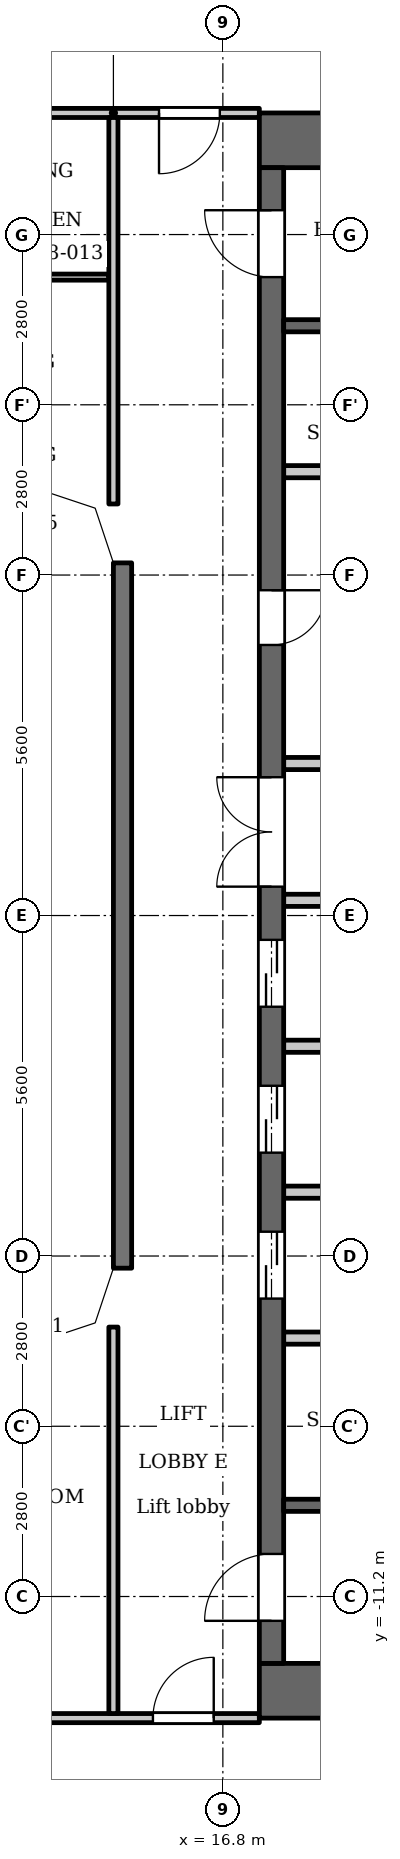
"""IFC4 building model, lengths in metres.
Left out: names, types, materials, properties, quantities, classifications, styles, units other than length and angle.
Written with IfcOpenShell. Run it as: python <this file> out.ifc"""

import sys

from ifc_helpers import new_model, si_unit, direction, frame, frame_2d, origin, place, context, subcontext, project, spatial, polyline, rectangle, outline, extrude, element, fill, save


model = new_model("IFC4")
c1 = context("Model", 3, precision=1e-05, world=origin(), true_north=direction((0.0, 1.0)))
c2 = subcontext(c1, "Body", "Model", "MODEL_VIEW")
j1 = project(units=[si_unit("LENGTHUNIT", "METRE"), si_unit("PLANEANGLEUNIT", "RADIAN")], contexts=[c1])
p1 = place(None, origin())
s1 = spatial("IfcSite", under=j1, at=p1, CompositionType="ELEMENT")
p2 = place(p1, origin())
s2 = spatial("IfcBuilding", under=s1, at=p2, CompositionType="ELEMENT")
p3 = place(p2, frame((0.0, 0.0, 111.3)))
s3 = spatial("IfcBuildingStorey", under=s2, at=p3, CompositionType="ELEMENT", Elevation=111.3)
p4 = place(p3, frame((15.15, 5.8, 0.0), z_axis=(0.0, 0.0, 1.0), x_axis=(0.0, -1.0, 0.0)))
e1 = element("IfcWall", 1, at=p4, inside=s3, PredefinedType="SOLIDWALL", context=c2, shape_type="SweptSolid", body=[
    extrude(rectangle(XDim=11.6, YDim=0.3, at=frame_2d((5.8, 0.0))), origin(), (0.0, 0.0, 1.0), 3.2),
])
for number, where, z_axis, x_axis in (
    (2, (17.4, 12.75, 0.0), (0.0, 0.0, 1.0), (1.0, 0.0, 0.0)),
    (3, (17.4, -12.75, 0.0), (0.0, 0.0, 1.0), (1.0, 0.0, 0.0)),
):
    element("IfcWall", number, at=place(p3, frame(where, z_axis=z_axis, x_axis=x_axis)), inside=s3, PredefinedType="SHEAR", context=c2, shape_type="SweptSolid", body=[
        extrude(rectangle(XDim=10.4, YDim=0.9, at=frame_2d((5.2, 0.0))), origin(), (0.0, 0.0, 1.0), 3.2),
    ])
p5 = place(p3, frame((17.6, -12.3, 0.0), z_axis=(0.0, 0.0, 1.0), x_axis=(0.0, 1.0, 0.0)))
e4 = element("IfcWall", 4, at=p5, inside=s3, PredefinedType="SHEAR", context=c2, shape_type="SweptSolid", body=[
    extrude(rectangle(XDim=24.6, YDim=0.4, at=frame_2d((12.3, 0.0))), origin(), (0.0, 0.0, 1.0), 3.2),
])
p6 = place(p5, frame((6.0, 0.0, 0.0)))
e5 = element("IfcOpeningElement", 5, at=p6, cuts=e4, PredefinedType="OPENING", context=c2, shape_type="SweptSolid", body=[
    extrude(rectangle(XDim=1.1, YDim=2.1, at=frame_2d((0.55, 1.05))), frame((0.0, 0.21, 0.0), z_axis=(0.0, -1.0, 0.0), x_axis=(1.0, 0.0, 0.0)), (0.0, 0.0, 1.0), 0.42),
])
p7 = place(p5, frame((8.4, 0.0, 0.0)))
e6 = element("IfcOpeningElement", 6, at=p7, cuts=e4, PredefinedType="OPENING", context=c2, shape_type="SweptSolid", body=[
    extrude(rectangle(XDim=1.1, YDim=2.1, at=frame_2d((0.55, 1.05))), frame((0.0, 0.21, 0.0), z_axis=(0.0, -1.0, 0.0), x_axis=(1.0, 0.0, 0.0)), (0.0, 0.0, 1.0), 0.42),
])
p8 = place(p5, frame((10.8, 0.0, 0.0)))
e7 = element("IfcOpeningElement", 7, at=p8, cuts=e4, PredefinedType="OPENING", context=c2, shape_type="SweptSolid", body=[
    extrude(rectangle(XDim=1.1, YDim=2.1, at=frame_2d((0.55, 1.05))), frame((0.0, 0.21, 0.0), z_axis=(0.0, -1.0, 0.0), x_axis=(1.0, 0.0, 0.0)), (0.0, 0.0, 1.0), 0.42),
])
p9 = place(p5, frame((16.75, 0.0, 0.0)))
e8 = element("IfcOpeningElement", 8, at=p9, cuts=e4, PredefinedType="OPENING", context=c2, shape_type="SweptSolid", body=[
    extrude(rectangle(XDim=0.9, YDim=2.1, at=frame_2d((0.45, 1.05))), frame((0.0, 0.21, 0.0), z_axis=(0.0, -1.0, 0.0), x_axis=(1.0, 0.0, 0.0)), (0.0, 0.0, 1.0), 0.42),
])
p10 = place(p5, frame((22.8, 0.0, 0.0)))
e9 = element("IfcOpeningElement", 9, at=p10, cuts=e4, PredefinedType="OPENING", context=c2, shape_type="SweptSolid", body=[
    extrude(rectangle(XDim=1.1, YDim=2.1, at=frame_2d((0.55, 1.05))), frame((0.0, 0.21, 0.0), z_axis=(0.0, -1.0, 0.0), x_axis=(1.0, 0.0, 0.0)), (0.0, 0.0, 1.0), 0.42),
])
p11 = place(p5, frame((0.7, 0.0, 0.0)))
e10 = element("IfcOpeningElement", 10, at=p11, cuts=e4, PredefinedType="OPENING", context=c2, shape_type="SweptSolid", body=[
    extrude(rectangle(XDim=1.1, YDim=2.1, at=frame_2d((0.55, 1.05))), frame((0.0, 0.21, 0.0), z_axis=(0.0, -1.0, 0.0), x_axis=(1.0, 0.0, 0.0)), (0.0, 0.0, 1.0), 0.42),
])
p12 = place(p5, frame((12.775, 0.0, 0.0)))
e11 = element("IfcOpeningElement", 11, at=p12, cuts=e4, PredefinedType="OPENING", context=c2, shape_type="SweptSolid", body=[
    extrude(rectangle(XDim=1.8, YDim=2.1, at=frame_2d((0.9, 1.05))), frame((0.0, 0.21, 0.0), z_axis=(0.0, -1.0, 0.0), x_axis=(1.0, 0.0, 0.0)), (0.0, 0.0, 1.0), 0.42),
])
p13 = place(p3, frame((17.8, -9.7, 0.0), z_axis=(0.0, 0.0, 1.0), x_axis=(1.0, 0.0, 0.0)))
e12 = element("IfcWall", 12, at=p13, inside=s3, PredefinedType="SHEAR", context=c2, shape_type="SweptSolid", body=[
    extrude(rectangle(XDim=8.3, YDim=0.2, at=frame_2d((4.15, 0.0))), origin(), (0.0, 0.0, 1.0), 3.2),
])
p14 = place(p13, frame((0.85, 0.0, 0.0)))
e13 = element("IfcOpeningElement", 13, at=p14, cuts=e12, PredefinedType="OPENING", context=c2, shape_type="SweptSolid", body=[
    extrude(rectangle(XDim=1.1, YDim=2.1, at=frame_2d((0.55, 1.05))), frame((0.0, 0.11, 0.0), z_axis=(0.0, -1.0, 0.0), x_axis=(1.0, 0.0, 0.0)), (0.0, 0.0, 1.0), 0.22),
])
p15 = place(p13, frame((3.75, 0.0, 0.0)))
e14 = element("IfcOpeningElement", 14, at=p15, cuts=e12, PredefinedType="OPENING", context=c2, shape_type="SweptSolid", body=[
    extrude(rectangle(XDim=1.1, YDim=2.1, at=frame_2d((0.55, 1.05))), frame((0.0, 0.11, 0.0), z_axis=(0.0, -1.0, 0.0), x_axis=(1.0, 0.0, 0.0)), (0.0, 0.0, 1.0), 0.22),
])
for number, where, z_axis, x_axis in (
    (15, (17.8, -6.95, 0.0), (0.0, 0.0, 1.0), (1.0, 0.0, 0.0)),
    (16, (17.8, -4.55, 0.0), (0.0, 0.0, 1.0), (1.0, 0.0, 0.0)),
    (17, (17.8, -2.15, 0.0), (0.0, 0.0, 1.0), (1.0, 0.0, 0.0)),
):
    element("IfcWall", number, at=place(p3, frame(where, z_axis=z_axis, x_axis=x_axis)), inside=s3, PredefinedType="PARTITIONING", context=c2, shape_type="SweptSolid", body=[
        extrude(rectangle(XDim=2.8, YDim=0.2, at=frame_2d((1.4, 0.0))), origin(), (0.0, 0.0, 1.0), 3.2),
    ])
for number, where, z_axis, x_axis in (
    (18, (17.8, 0.25, 0.0), (0.0, 0.0, 1.0), (1.0, 0.0, 0.0)),
    (19, (17.8, 2.5, 0.0), (0.0, 0.0, 1.0), (1.0, 0.0, 0.0)),
):
    element("IfcWall", number, at=place(p3, frame(where, z_axis=z_axis, x_axis=x_axis)), inside=s3, PredefinedType="PARTITIONING", context=c2, shape_type="SweptSolid", body=[
        extrude(rectangle(XDim=3.0, YDim=0.2, at=frame_2d((1.5, 0.0))), origin(), (0.0, 0.0, 1.0), 3.2),
    ])
p16 = place(p3, frame((17.8, 7.3, 0.0), z_axis=(0.0, 0.0, 1.0), x_axis=(1.0, 0.0, 0.0)))
e20 = element("IfcWall", 20, at=p16, inside=s3, PredefinedType="PARTITIONING", context=c2, shape_type="SweptSolid", body=[
    extrude(rectangle(XDim=2.8, YDim=0.2, at=frame_2d((1.4, 0.0))), origin(), (0.0, 0.0, 1.0), 3.2),
])
p17 = place(p3, frame((17.8, 9.7, 0.0), z_axis=(0.0, 0.0, 1.0), x_axis=(1.0, 0.0, 0.0)))
e21 = element("IfcWall", 21, at=p17, inside=s3, PredefinedType="SHEAR", context=c2, shape_type="SweptSolid", body=[
    extrude(rectangle(XDim=8.3, YDim=0.2, at=frame_2d((4.15, 0.0))), origin(), (0.0, 0.0, 1.0), 3.2),
])
p18 = place(p17, frame((0.85, 0.0, 0.0)))
e22 = element("IfcOpeningElement", 22, at=p18, cuts=e21, PredefinedType="OPENING", context=c2, shape_type="SweptSolid", body=[
    extrude(rectangle(XDim=1.1, YDim=2.1, at=frame_2d((0.55, 1.05))), frame((0.0, 0.11, 0.0), z_axis=(0.0, -1.0, 0.0), x_axis=(1.0, 0.0, 0.0)), (0.0, 0.0, 1.0), 0.22),
])
p19 = place(p17, frame((3.75, 0.0, 0.0)))
e23 = element("IfcOpeningElement", 23, at=p19, cuts=e21, PredefinedType="OPENING", context=c2, shape_type="SweptSolid", body=[
    extrude(rectangle(XDim=1.1, YDim=2.1, at=frame_2d((0.55, 1.05))), frame((0.0, 0.11, 0.0), z_axis=(0.0, -1.0, 0.0), x_axis=(1.0, 0.0, 0.0)), (0.0, 0.0, 1.0), 0.22),
])
p20 = place(p3, frame((-17.4, -13.2, 0.0), z_axis=(0.0, 0.0, 1.0), x_axis=(1.0, 0.0, 0.0)))
e24 = element("IfcWall", 24, at=p20, inside=s3, PredefinedType="PARTITIONING", context=c2, shape_type="SweptSolid", body=[
    extrude(rectangle(XDim=34.8, YDim=0.15, at=frame_2d((17.4, 0.0))), origin(), (0.0, 0.0, 1.0), 3.2),
])
p21 = place(p20, frame((0.65, 0.0, 0.0)))
e25 = element("IfcOpeningElement", 25, at=p21, cuts=e24, PredefinedType="OPENING", context=c2, shape_type="SweptSolid", body=[
    extrude(rectangle(XDim=1.0, YDim=2.1, at=frame_2d((0.5, 1.05))), frame((0.0, 0.085, 0.0), z_axis=(0.0, -1.0, 0.0), x_axis=(1.0, 0.0, 0.0)), (0.0, 0.0, 1.0), 0.17),
])
p22 = place(p20, frame((33.05, 0.0, 0.0)))
e26 = element("IfcOpeningElement", 26, at=p22, cuts=e24, PredefinedType="OPENING", context=c2, shape_type="SweptSolid", body=[
    extrude(rectangle(XDim=1.0, YDim=2.1, at=frame_2d((0.5, 1.05))), frame((0.0, 0.085, 0.0), z_axis=(0.0, -1.0, 0.0), x_axis=(1.0, 0.0, 0.0)), (0.0, 0.0, 1.0), 0.17),
])
p23 = place(p20, frame((4.55, 0.0, 0.0)))
e27 = element("IfcOpeningElement", 27, at=p23, cuts=e24, PredefinedType="OPENING", context=c2, shape_type="SweptSolid", body=[
    extrude(rectangle(XDim=1.0, YDim=2.1, at=frame_2d((0.5, 1.05))), frame((0.0, 0.085, 0.0), z_axis=(0.0, -1.0, 0.0), x_axis=(1.0, 0.0, 0.0)), (0.0, 0.0, 1.0), 0.17),
])
p24 = place(p20, frame((6.9, 0.0, 0.0)))
e28 = element("IfcOpeningElement", 28, at=p24, cuts=e24, PredefinedType="OPENING", context=c2, shape_type="SweptSolid", body=[
    extrude(rectangle(XDim=1.0, YDim=2.1, at=frame_2d((0.5, 1.05))), frame((0.0, 0.085, 0.0), z_axis=(0.0, -1.0, 0.0), x_axis=(1.0, 0.0, 0.0)), (0.0, 0.0, 1.0), 0.17),
])
p25 = place(p20, frame((15.75, 0.0, 0.0)))
e29 = element("IfcOpeningElement", 29, at=p25, cuts=e24, PredefinedType="OPENING", context=c2, shape_type="SweptSolid", body=[
    extrude(rectangle(XDim=1.0, YDim=2.1, at=frame_2d((0.5, 1.05))), frame((0.0, 0.085, 0.0), z_axis=(0.0, -1.0, 0.0), x_axis=(1.0, 0.0, 0.0)), (0.0, 0.0, 1.0), 0.17),
])
p26 = place(p20, frame((18.1, 0.0, 0.0)))
e30 = element("IfcOpeningElement", 30, at=p26, cuts=e24, PredefinedType="OPENING", context=c2, shape_type="SweptSolid", body=[
    extrude(rectangle(XDim=1.0, YDim=2.1, at=frame_2d((0.5, 1.05))), frame((0.0, 0.085, 0.0), z_axis=(0.0, -1.0, 0.0), x_axis=(1.0, 0.0, 0.0)), (0.0, 0.0, 1.0), 0.17),
])
p27 = place(p20, frame((26.95, 0.0, 0.0)))
e31 = element("IfcOpeningElement", 31, at=p27, cuts=e24, PredefinedType="OPENING", context=c2, shape_type="SweptSolid", body=[
    extrude(rectangle(XDim=1.0, YDim=2.1, at=frame_2d((0.5, 1.05))), frame((0.0, 0.085, 0.0), z_axis=(0.0, -1.0, 0.0), x_axis=(1.0, 0.0, 0.0)), (0.0, 0.0, 1.0), 0.17),
])
p28 = place(p20, frame((29.25, 0.0, 0.0)))
e32 = element("IfcOpeningElement", 32, at=p28, cuts=e24, PredefinedType="OPENING", context=c2, shape_type="SweptSolid", body=[
    extrude(rectangle(XDim=1.0, YDim=2.1, at=frame_2d((0.5, 1.05))), frame((0.0, 0.085, 0.0), z_axis=(0.0, -1.0, 0.0), x_axis=(1.0, 0.0, 0.0)), (0.0, 0.0, 1.0), 0.17),
])
p29 = place(p3, frame((-14.925, 10.5, 0.0), z_axis=(0.0, 0.0, 1.0), x_axis=(1.0, 0.0, 0.0)))
e33 = element("IfcWall", 33, at=p29, inside=s3, PredefinedType="PARTITIONING", context=c2, shape_type="SweptSolid", body=[
    extrude(rectangle(XDim=29.85, YDim=0.1, at=frame_2d((14.925, 0.0))), origin(), (0.0, 0.0, 1.0), 3.2),
])
p30 = place(p29, frame((0.525, 0.0, 0.0)))
e34 = element("IfcOpeningElement", 34, at=p30, cuts=e33, PredefinedType="OPENING", context=c2, shape_type="SweptSolid", body=[
    extrude(rectangle(XDim=0.8, YDim=2.1, at=frame_2d((0.4, 1.05))), frame((0.0, 0.06, 0.0), z_axis=(0.0, -1.0, 0.0), x_axis=(1.0, 0.0, 0.0)), (0.0, 0.0, 1.0), 0.12),
])
p31 = place(p29, frame((4.375, 0.0, 0.0)))
e35 = element("IfcOpeningElement", 35, at=p31, cuts=e33, PredefinedType="OPENING", context=c2, shape_type="SweptSolid", body=[
    extrude(rectangle(XDim=0.9, YDim=2.1, at=frame_2d((0.45, 1.05))), frame((0.0, 0.06, 0.0), z_axis=(0.0, -1.0, 0.0), x_axis=(1.0, 0.0, 0.0)), (0.0, 0.0, 1.0), 0.12),
])
p32 = place(p29, frame((18.825, 0.0, 0.0)))
e36 = element("IfcOpeningElement", 36, at=p32, cuts=e33, PredefinedType="OPENING", context=c2, shape_type="SweptSolid", body=[
    extrude(rectangle(XDim=0.8, YDim=2.1, at=frame_2d((0.4, 1.05))), frame((0.0, 0.06, 0.0), z_axis=(0.0, -1.0, 0.0), x_axis=(1.0, 0.0, 0.0)), (0.0, 0.0, 1.0), 0.12),
])
p33 = place(p29, frame((16.325, 0.0, 0.0)))
e37 = element("IfcOpeningElement", 37, at=p33, cuts=e33, PredefinedType="OPENING", context=c2, shape_type="SweptSolid", body=[
    extrude(rectangle(XDim=0.9, YDim=2.1, at=frame_2d((0.45, 1.05))), frame((0.0, 0.06, 0.0), z_axis=(0.0, -1.0, 0.0), x_axis=(1.0, 0.0, 0.0)), (0.0, 0.0, 1.0), 0.12),
])
p34 = place(p29, frame((10.225, 0.0, 0.0)))
e38 = element("IfcOpeningElement", 38, at=p34, cuts=e33, PredefinedType="OPENING", context=c2, shape_type="SweptSolid", body=[
    extrude(rectangle(XDim=0.9, YDim=2.1, at=frame_2d((0.45, 1.05))), frame((0.0, 0.06, 0.0), z_axis=(0.0, -1.0, 0.0), x_axis=(1.0, 0.0, 0.0)), (0.0, 0.0, 1.0), 0.12),
])
p35 = place(p29, frame((13.325, 0.0, 0.0)))
e39 = element("IfcOpeningElement", 39, at=p35, cuts=e33, PredefinedType="OPENING", context=c2, shape_type="SweptSolid", body=[
    extrude(rectangle(XDim=0.9, YDim=2.1, at=frame_2d((0.45, 1.05))), frame((0.0, 0.06, 0.0), z_axis=(0.0, -1.0, 0.0), x_axis=(1.0, 0.0, 0.0)), (0.0, 0.0, 1.0), 0.12),
])
p36 = place(p29, frame((21.175, 0.0, 0.0)))
e40 = element("IfcOpeningElement", 40, at=p36, cuts=e33, PredefinedType="OPENING", context=c2, shape_type="SweptSolid", body=[
    extrude(rectangle(XDim=0.8, YDim=2.1, at=frame_2d((0.4, 1.05))), frame((0.0, 0.06, 0.0), z_axis=(0.0, -1.0, 0.0), x_axis=(1.0, 0.0, 0.0)), (0.0, 0.0, 1.0), 0.12),
])
p37 = place(p29, frame((26.775, 0.0, 0.0)))
e41 = element("IfcOpeningElement", 41, at=p37, cuts=e33, PredefinedType="OPENING", context=c2, shape_type="SweptSolid", body=[
    extrude(rectangle(XDim=0.9, YDim=2.1, at=frame_2d((0.45, 1.05))), frame((0.0, 0.06, 0.0), z_axis=(0.0, -1.0, 0.0), x_axis=(1.0, 0.0, 0.0)), (0.0, 0.0, 1.0), 0.12),
])
p38 = place(p3, frame((-17.4, 13.2, 0.0), z_axis=(0.0, 0.0, 1.0), x_axis=(1.0, 0.0, 0.0)))
e42 = element("IfcWall", 42, at=p38, inside=s3, PredefinedType="PARTITIONING", context=c2, shape_type="SweptSolid", body=[
    extrude(rectangle(XDim=34.8, YDim=0.15, at=frame_2d((17.4, 0.0))), origin(), (0.0, 0.0, 1.0), 3.2),
])
p39 = place(p38, frame((0.75, 0.0, 0.0)))
e43 = element("IfcOpeningElement", 43, at=p39, cuts=e42, PredefinedType="OPENING", context=c2, shape_type="SweptSolid", body=[
    extrude(rectangle(XDim=1.0, YDim=2.1, at=frame_2d((0.5, 1.05))), frame((0.0, 0.085, 0.0), z_axis=(0.0, -1.0, 0.0), x_axis=(1.0, 0.0, 0.0)), (0.0, 0.0, 1.0), 0.17),
])
p40 = place(p38, frame((33.15, 0.0, 0.0)))
e44 = element("IfcOpeningElement", 44, at=p40, cuts=e42, PredefinedType="OPENING", context=c2, shape_type="SweptSolid", body=[
    extrude(rectangle(XDim=1.0, YDim=2.1, at=frame_2d((0.5, 1.05))), frame((0.0, 0.085, 0.0), z_axis=(0.0, -1.0, 0.0), x_axis=(1.0, 0.0, 0.0)), (0.0, 0.0, 1.0), 0.17),
])
p41 = place(p38, frame((6.85, 0.0, 0.0)))
e45 = element("IfcOpeningElement", 45, at=p41, cuts=e42, PredefinedType="OPENING", context=c2, shape_type="SweptSolid", body=[
    extrude(rectangle(XDim=1.0, YDim=2.1, at=frame_2d((0.5, 1.05))), frame((0.0, 0.085, 0.0), z_axis=(0.0, -1.0, 0.0), x_axis=(1.0, 0.0, 0.0)), (0.0, 0.0, 1.0), 0.17),
])
p42 = place(p38, frame((12.45, 0.0, 0.0)))
e46 = element("IfcOpeningElement", 46, at=p42, cuts=e42, PredefinedType="OPENING", context=c2, shape_type="SweptSolid", body=[
    extrude(rectangle(XDim=1.0, YDim=2.1, at=frame_2d((0.5, 1.05))), frame((0.0, 0.085, 0.0), z_axis=(0.0, -1.0, 0.0), x_axis=(1.0, 0.0, 0.0)), (0.0, 0.0, 1.0), 0.17),
])
p43 = place(p38, frame((29.25, 0.0, 0.0)))
e47 = element("IfcOpeningElement", 47, at=p43, cuts=e42, PredefinedType="OPENING", context=c2, shape_type="SweptSolid", body=[
    extrude(rectangle(XDim=1.0, YDim=2.1, at=frame_2d((0.5, 1.05))), frame((0.0, 0.085, 0.0), z_axis=(0.0, -1.0, 0.0), x_axis=(1.0, 0.0, 0.0)), (0.0, 0.0, 1.0), 0.17),
])
for number, where, z_axis, x_axis in (
    (48, (15.0, -13.125, 0.0), (0.0, 0.0, 1.0), (0.0, 1.0, 0.0)),
    (49, (15.0, 6.769, 0.0), (0.0, 0.0, 1.0), (0.0, 1.0, 0.0)),
):
    element("IfcWall", number, at=place(p3, frame(where, z_axis=z_axis, x_axis=x_axis)), inside=s3, PredefinedType="PARTITIONING", context=c2, shape_type="SweptSolid", body=[
        extrude(rectangle(XDim=6.356, YDim=0.15, at=frame_2d((3.178, 0.0))), origin(), (0.0, 0.0, 1.0), 3.2),
    ])
p44 = place(p3, origin())
e50 = element("IfcWall", 50, at=p44, inside=s3, PredefinedType="SOLIDWALL", context=c2, shape_type="SweptSolid", body=[
    extrude(outline(polyline([(14.937, 6.937), (13.849, 7.3), (13.8, 7.3), (13.8, 7.0), (14.7, 6.7), (15.0, 5.8), (15.3, 5.8), (15.3, 5.849), (14.937, 6.937)])), origin(), (0.0, 0.0, 1.0), 3.2),
])
e51 = element("IfcWall", 51, at=p44, inside=s3, PredefinedType="SOLIDWALL", context=c2, shape_type="SweptSolid", body=[
    extrude(outline(polyline([(14.937, -6.937), (15.3, -5.849), (15.3, -5.8), (15.0, -5.8), (14.7, -6.7), (13.8, -7.0), (13.8, -7.3), (13.849, -7.3), (14.937, -6.937)])), origin(), (0.0, 0.0, 1.0), 3.2),
])
p45 = place(p6, origin())
e52 = element("IfcDoor", 52, at=p45, inside=s3, OperationType="DOUBLE_DOOR_SLIDING", PredefinedType="DOOR", context=c2, shape_type="SweptSolid", body=[
    extrude(rectangle(XDim=1.1, YDim=2.1, at=frame_2d((0.55, 1.05))), frame((0.0, 0.025, 0.0), z_axis=(0.0, -1.0, 0.0), x_axis=(1.0, 0.0, 0.0)), (0.0, 0.0, 1.0), 0.05),
])
fill(e5, e52)
p46 = place(p7, origin())
e53 = element("IfcDoor", 53, at=p46, inside=s3, OperationType="DOUBLE_DOOR_SLIDING", PredefinedType="DOOR", context=c2, shape_type="SweptSolid", body=[
    extrude(rectangle(XDim=1.1, YDim=2.1, at=frame_2d((0.55, 1.05))), frame((0.0, 0.025, 0.0), z_axis=(0.0, -1.0, 0.0), x_axis=(1.0, 0.0, 0.0)), (0.0, 0.0, 1.0), 0.05),
])
fill(e6, e53)
p47 = place(p8, origin())
e54 = element("IfcDoor", 54, at=p47, inside=s3, OperationType="DOUBLE_DOOR_SLIDING", PredefinedType="DOOR", context=c2, shape_type="SweptSolid", body=[
    extrude(rectangle(XDim=1.1, YDim=2.1, at=frame_2d((0.55, 1.05))), frame((0.0, 0.025, 0.0), z_axis=(0.0, -1.0, 0.0), x_axis=(1.0, 0.0, 0.0)), (0.0, 0.0, 1.0), 0.05),
])
fill(e7, e54)
p48 = place(p9, origin())
e55 = element("IfcDoor", 55, at=p48, inside=s3, OperationType="SINGLE_SWING_RIGHT", PredefinedType="DOOR", context=c2, shape_type="SweptSolid", body=[
    extrude(rectangle(XDim=0.9, YDim=2.1, at=frame_2d((0.45, 1.05))), frame((0.0, 0.025, 0.0), z_axis=(0.0, -1.0, 0.0), x_axis=(1.0, 0.0, 0.0)), (0.0, 0.0, 1.0), 0.05),
])
fill(e8, e55)
p49 = place(p10, origin())
e56 = element("IfcDoor", 56, at=p49, inside=s3, OperationType="SINGLE_SWING_LEFT", PredefinedType="DOOR", context=c2, shape_type="SweptSolid", body=[
    extrude(rectangle(XDim=1.1, YDim=2.1, at=frame_2d((0.55, 1.05))), frame((0.0, 0.025, 0.0), z_axis=(0.0, -1.0, 0.0), x_axis=(1.0, 0.0, 0.0)), (0.0, 0.0, 1.0), 0.05),
])
fill(e9, e56)
p50 = place(p11, origin())
e57 = element("IfcDoor", 57, at=p50, inside=s3, OperationType="SINGLE_SWING_RIGHT", PredefinedType="DOOR", context=c2, shape_type="SweptSolid", body=[
    extrude(rectangle(XDim=1.1, YDim=2.1, at=frame_2d((0.55, 1.05))), frame((0.0, 0.025, 0.0), z_axis=(0.0, -1.0, 0.0), x_axis=(1.0, 0.0, 0.0)), (0.0, 0.0, 1.0), 0.05),
])
fill(e10, e57)
p51 = place(p12, origin())
e58 = element("IfcDoor", 58, at=p51, inside=s3, OperationType="DOUBLE_DOOR_SINGLE_SWING", PredefinedType="DOOR", context=c2, shape_type="SweptSolid", body=[
    extrude(rectangle(XDim=1.8, YDim=2.1, at=frame_2d((0.9, 1.05))), frame((0.0, 0.025, 0.0), z_axis=(0.0, -1.0, 0.0), x_axis=(1.0, 0.0, 0.0)), (0.0, 0.0, 1.0), 0.05),
])
fill(e11, e58)
p52 = place(p40, origin())
e59 = element("IfcDoor", 59, at=p52, inside=s3, OperationType="SINGLE_SWING_LEFT", PredefinedType="DOOR", context=c2, shape_type="SweptSolid", body=[
    extrude(rectangle(XDim=1.0, YDim=2.1, at=frame_2d((0.5, 1.05))), frame((0.0, 0.025, 0.0), z_axis=(0.0, -1.0, 0.0), x_axis=(1.0, 0.0, 0.0)), (0.0, 0.0, 1.0), 0.05),
])
fill(e44, e59)
p53 = place(p22, origin())
e60 = element("IfcDoor", 60, at=p53, inside=s3, OperationType="SINGLE_SWING_LEFT", PredefinedType="DOOR", context=c2, shape_type="SweptSolid", body=[
    extrude(rectangle(XDim=1.0, YDim=2.1, at=frame_2d((0.5, 1.05))), frame((0.0, 0.025, 0.0), z_axis=(0.0, -1.0, 0.0), x_axis=(1.0, 0.0, 0.0)), (0.0, 0.0, 1.0), 0.05),
])
fill(e26, e60)
save(model, sys.argv[1])
